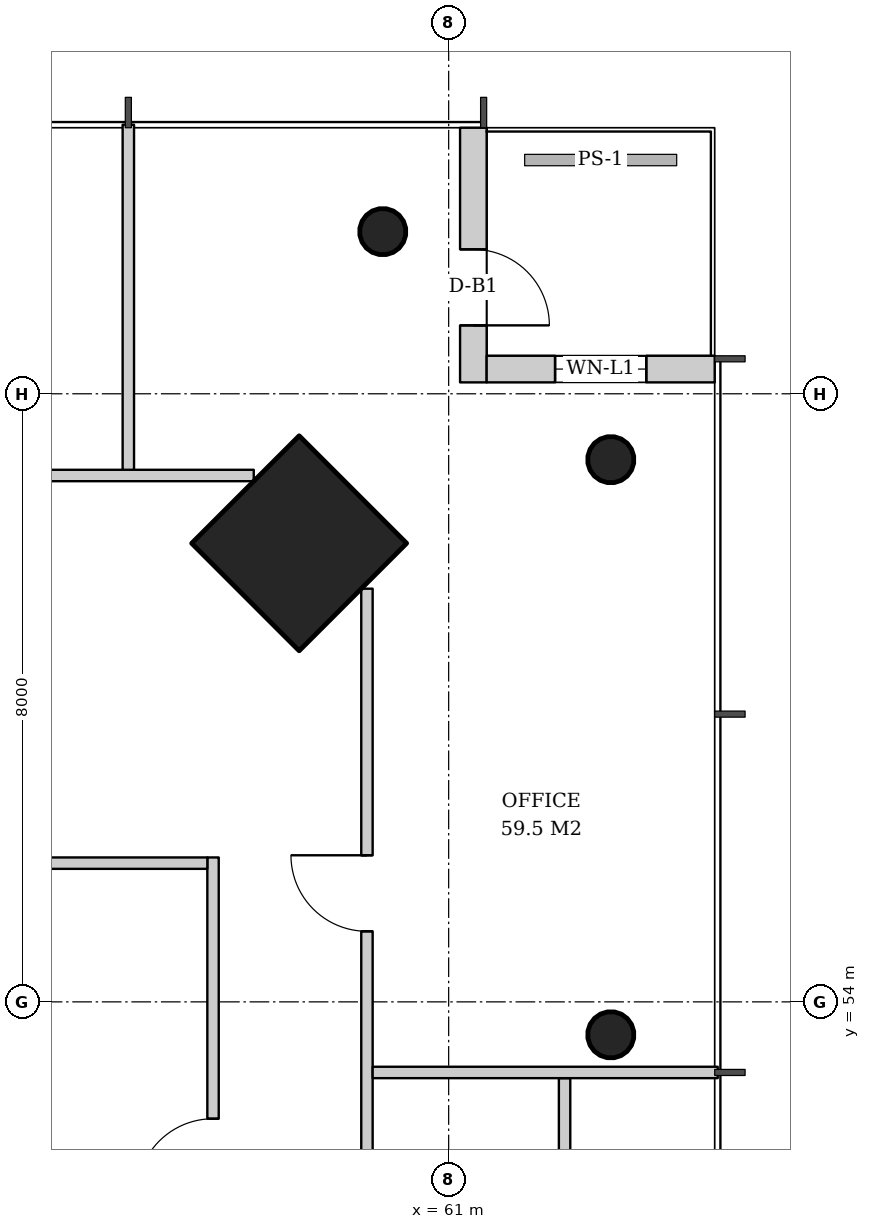
"""IFC4 building model, lengths in metres.
Left out: names, types, materials, properties, quantities, classifications, styles, units other than length and angle.
Written with IfcOpenShell. Run it as: python <this file> out.ifc"""

import sys

from ifc_helpers import new_model, si_unit, direction, frame, frame_2d, origin, origin_2d, place, context, subcontext, project, spatial, rectangle, hollow_circle, extrude, element, fill, save


model = new_model("IFC4")
c1 = context("Model", 3, precision=1e-05, world=origin(), true_north=direction((0.0, 1.0)))
c2 = subcontext(c1, "Body", "Model", "MODEL_VIEW")
j1 = project(units=[si_unit("LENGTHUNIT", "METRE"), si_unit("PLANEANGLEUNIT", "RADIAN")], contexts=[c1])
p1 = place(None, origin())
s1 = spatial("IfcSite", under=j1, at=p1, CompositionType="ELEMENT")
p2 = place(p1, origin())
s2 = spatial("IfcBuilding", under=s1, at=p2, CompositionType="ELEMENT")
p3 = place(p2, frame((0.0, 0.0, 203.4)))
s3 = spatial("IfcBuildingStorey", under=s2, at=p3, CompositionType="ELEMENT", Elevation=203.4)
p4 = place(p3, frame((59.072, 60.072, 0.0), z_axis=(-0.031962158256, -0.031962158256, 0.998977898093), x_axis=(0.707106781187, -0.707106781187, 0.0)))
e1 = element("IfcColumn", 1, at=p4, inside=s3, PredefinedType="COLUMN", context=c2, shape_type="SweptSolid", body=[
    extrude(rectangle(XDim=2.0, YDim=2.0, at=origin_2d()), origin(), (0.0, 0.0, 1.0), 3.804),
])
p5 = place(p3, frame((63.171, 61.171, 0.0), z_axis=(-0.031898107953, -0.031898107953, 0.998981992539), x_axis=(0.707106781187, -0.707106781187, 0.0)))
e2 = element("IfcColumn", 2, at=p5, inside=s3, PredefinedType="COLUMN", context=c2, shape_type="SweptSolid", body=[
    extrude(hollow_circle(Radius=0.305, WallThickness=0.025, at=origin_2d()), origin(), (0.0, 0.0, 1.0), 3.804),
])
p6 = place(p3, frame((63.171, 53.586, 0.0), z_axis=(-0.031910269556, -0.015987237665, 0.999362868496), x_axis=(0.447933021895, -0.894067115991, 0.0)))
e3 = element("IfcColumn", 3, at=p6, inside=s3, PredefinedType="COLUMN", context=c2, shape_type="SweptSolid", body=[
    extrude(hollow_circle(Radius=0.305, WallThickness=0.025, at=origin_2d()), origin(), (0.0, 0.0, 1.0), 3.802),
])
p7 = place(p3, frame((60.171, 64.171, 0.0), z_axis=(-0.031898107953, -0.031898107953, 0.998981992539), x_axis=(0.707106781187, -0.707106781187, 0.0)))
e4 = element("IfcColumn", 4, at=p7, inside=s3, PredefinedType="COLUMN", context=c2, shape_type="SweptSolid", body=[
    extrude(hollow_circle(Radius=0.305, WallThickness=0.025, at=origin_2d()), origin(), (0.0, 0.0, 1.0), 3.804),
])
p8 = place(p3, frame((61.325, 65.5, 0.0), z_axis=(0.0, 0.0, 1.0), x_axis=(0.0, -1.0, 0.0)))
e5 = element("IfcWall", 5, at=p8, inside=s3, PredefinedType="SOLIDWALL", context=c2, shape_type="SweptSolid", body=[
    extrude(rectangle(XDim=3.35, YDim=0.35, at=frame_2d((1.675, 0.0))), origin(), (0.0, 0.0, 1.0), 3.62),
])
p9 = place(p8, frame((1.6, 0.0, 0.0)))
e6 = element("IfcOpeningElement", 6, at=p9, cuts=e5, PredefinedType="OPENING", context=c2, shape_type="SweptSolid", body=[
    extrude(rectangle(XDim=1.0, YDim=2.4, at=frame_2d((0.5, 1.2))), frame((0.0, 0.185, 0.0), z_axis=(0.0, -1.0, 0.0), x_axis=(1.0, 0.0, 0.0)), (0.0, 0.0, 1.0), 0.37),
])
p10 = place(p3, frame((61.5, 62.325, 0.0), z_axis=(0.0, 0.0, 1.0), x_axis=(1.0, 0.0, 0.0)))
e7 = element("IfcWall", 7, at=p10, inside=s3, PredefinedType="SOLIDWALL", context=c2, shape_type="SweptSolid", body=[
    extrude(rectangle(XDim=3.0, YDim=0.35, at=frame_2d((1.5, 0.0))), origin(), (0.0, 0.0, 1.0), 3.62),
])
p11 = place(p10, frame((0.9, 0.0, 0.6)))
e8 = element("IfcOpeningElement", 8, at=p11, cuts=e7, PredefinedType="OPENING", context=c2, shape_type="SweptSolid", body=[
    extrude(rectangle(XDim=1.2, YDim=2.55, at=frame_2d((0.6, 1.275))), frame((0.0, 0.185, 0.0), z_axis=(0.0, -1.0, 0.0), x_axis=(1.0, 0.0, 0.0)), (0.0, 0.0, 1.0), 0.37),
])
p12 = place(p3, frame((57.9, 48.025, 0.0), z_axis=(0.0, 0.0, 1.0), x_axis=(0.0, 1.0, 0.0)))
e9 = element("IfcWall", 9, at=p12, inside=s3, PredefinedType="PARTITIONING", context=c2, shape_type="SweptSolid", body=[
    extrude(rectangle(XDim=7.875, YDim=0.15, at=frame_2d((3.938, 0.0))), origin(), (0.0, 0.0, 1.0), 2.867),
])
p13 = place(p12, frame((3.438, 0.0, 0.0)))
e10 = element("IfcOpeningElement", 10, at=p13, cuts=e9, PredefinedType="OPENING", context=c2, shape_type="SweptSolid", body=[
    extrude(rectangle(XDim=1.0, YDim=2.1, at=frame_2d((0.5, 1.05))), frame((0.0, 0.085, 0.0), z_axis=(0.0, -1.0, 0.0), x_axis=(1.0, 0.0, 0.0)), (0.0, 0.0, 1.0), 0.17),
])
p14 = place(p3, frame((54.9, 55.825, 0.0), z_axis=(0.0, 0.0, 1.0), x_axis=(1.0, 0.0, 0.0)))
e11 = element("IfcWall", 11, at=p14, inside=s3, PredefinedType="PARTITIONING", context=c2, shape_type="SweptSolid", body=[
    extrude(rectangle(XDim=2.925, YDim=0.15, at=frame_2d((1.462, 0.0))), origin(), (0.0, 0.0, 1.0), 3.62),
])
p15 = place(p3, frame((62.525, 48.432, 0.0), z_axis=(0.0, 0.0, 1.0), x_axis=(0.0, 1.0, 0.0)))
e12 = element("IfcWall", 12, at=p15, inside=s3, PredefinedType="PARTITIONING", context=c2, shape_type="SweptSolid", body=[
    extrude(rectangle(XDim=4.564, YDim=0.15, at=frame_2d((2.282, 0.0))), origin(), (0.0, 0.0, 1.0), 2.867),
])
p16 = place(p3, frame((59.925, 32.564, 0.0), z_axis=(0.0, 0.0, 1.0), x_axis=(0.0, 1.0, 0.0)))
e13 = element("IfcWall", 13, at=p16, inside=s3, PredefinedType="PARTITIONING", context=c2, shape_type="SweptSolid", body=[
    extrude(rectangle(XDim=26.872, YDim=0.15, at=frame_2d((13.436, 0.0))), origin(), (0.0, 0.0, 1.0), 2.867),
])
p17 = place(p16, frame((3.507, 0.0, 0.0)))
e14 = element("IfcOpeningElement", 14, at=p17, cuts=e13, PredefinedType="OPENING", context=c2, shape_type="SweptSolid", body=[
    extrude(rectangle(XDim=1.0, YDim=2.1, at=frame_2d((0.5, 1.05))), frame((0.0, 0.085, 0.0), z_axis=(0.0, -1.0, 0.0), x_axis=(1.0, 0.0, 0.0)), (0.0, 0.0, 1.0), 0.17),
])
p18 = place(p16, frame((8.221, 0.0, 0.0)))
e15 = element("IfcOpeningElement", 15, at=p18, cuts=e13, PredefinedType="OPENING", context=c2, shape_type="SweptSolid", body=[
    extrude(rectangle(XDim=1.0, YDim=2.1, at=frame_2d((0.5, 1.05))), frame((0.0, 0.085, 0.0), z_axis=(0.0, -1.0, 0.0), x_axis=(1.0, 0.0, 0.0)), (0.0, 0.0, 1.0), 0.17),
])
p19 = place(p16, frame((12.936, 0.0, 0.0)))
e16 = element("IfcOpeningElement", 16, at=p19, cuts=e13, PredefinedType="OPENING", context=c2, shape_type="SweptSolid", body=[
    extrude(rectangle(XDim=1.0, YDim=2.1, at=frame_2d((0.5, 1.05))), frame((0.0, 0.085, 0.0), z_axis=(0.0, -1.0, 0.0), x_axis=(1.0, 0.0, 0.0)), (0.0, 0.0, 1.0), 0.17),
])
p20 = place(p16, frame((17.65, 0.0, 0.0)))
e17 = element("IfcOpeningElement", 17, at=p20, cuts=e13, PredefinedType="OPENING", context=c2, shape_type="SweptSolid", body=[
    extrude(rectangle(XDim=1.0, YDim=2.1, at=frame_2d((0.5, 1.05))), frame((0.0, 0.085, 0.0), z_axis=(0.0, -1.0, 0.0), x_axis=(1.0, 0.0, 0.0)), (0.0, 0.0, 1.0), 0.17),
])
p21 = place(p16, frame((22.364, 0.0, 0.0)))
e18 = element("IfcOpeningElement", 18, at=p21, cuts=e13, PredefinedType="OPENING", context=c2, shape_type="SweptSolid", body=[
    extrude(rectangle(XDim=1.0, YDim=2.1, at=frame_2d((0.5, 1.05))), frame((0.0, 0.085, 0.0), z_axis=(0.0, -1.0, 0.0), x_axis=(1.0, 0.0, 0.0)), (0.0, 0.0, 1.0), 0.17),
])
p22 = place(p3, frame((60.0, 53.072, 0.0), z_axis=(0.0, 0.0, 1.0), x_axis=(1.0, 0.0, 0.0)))
e19 = element("IfcWall", 19, at=p22, inside=s3, PredefinedType="PARTITIONING", context=c2, shape_type="SweptSolid", body=[
    extrude(rectangle(XDim=4.54, YDim=0.15, at=frame_2d((2.27, 0.0))), origin(), (0.0, 0.0, 1.0), 3.12),
])
p23 = place(p3, frame((58.436, 60.925, 0.0), z_axis=(0.0, 0.0, 1.0), x_axis=(-1.0, 0.0, 0.0)))
e20 = element("IfcWall", 20, at=p23, inside=s3, PredefinedType="PARTITIONING", context=c2, shape_type="SweptSolid", body=[
    extrude(rectangle(XDim=26.872, YDim=0.15, at=frame_2d((13.436, 0.0))), origin(), (0.0, 0.0, 1.0), 2.867),
])
p24 = place(p23, frame((3.507, 0.0, 0.0)))
e21 = element("IfcOpeningElement", 21, at=p24, cuts=e20, PredefinedType="OPENING", context=c2, shape_type="SweptSolid", body=[
    extrude(rectangle(XDim=1.0, YDim=2.1, at=frame_2d((0.5, 1.05))), frame((0.0, 0.085, 0.0), z_axis=(0.0, -1.0, 0.0), x_axis=(1.0, 0.0, 0.0)), (0.0, 0.0, 1.0), 0.17),
])
p25 = place(p23, frame((8.221, 0.0, 0.0)))
e22 = element("IfcOpeningElement", 22, at=p25, cuts=e20, PredefinedType="OPENING", context=c2, shape_type="SweptSolid", body=[
    extrude(rectangle(XDim=1.0, YDim=2.1, at=frame_2d((0.5, 1.05))), frame((0.0, 0.085, 0.0), z_axis=(0.0, -1.0, 0.0), x_axis=(1.0, 0.0, 0.0)), (0.0, 0.0, 1.0), 0.17),
])
p26 = place(p23, frame((12.536, 0.0, 0.0)))
e23 = element("IfcOpeningElement", 23, at=p26, cuts=e20, PredefinedType="OPENING", context=c2, shape_type="SweptSolid", body=[
    extrude(rectangle(XDim=1.8, YDim=2.4, at=frame_2d((0.9, 1.2))), frame((0.0, 0.085, 0.0), z_axis=(0.0, -1.0, 0.0), x_axis=(1.0, 0.0, 0.0)), (0.0, 0.0, 1.0), 0.17),
])
p27 = place(p23, frame((22.364, 0.0, 0.0)))
e24 = element("IfcOpeningElement", 24, at=p27, cuts=e20, PredefinedType="OPENING", context=c2, shape_type="SweptSolid", body=[
    extrude(rectangle(XDim=1.0, YDim=2.1, at=frame_2d((0.5, 1.05))), frame((0.0, 0.085, 0.0), z_axis=(0.0, -1.0, 0.0), x_axis=(1.0, 0.0, 0.0)), (0.0, 0.0, 1.0), 0.17),
])
p28 = place(p3, frame((56.786, 61.0, 0.0), z_axis=(0.0, 0.0, 1.0), x_axis=(0.0, 1.0, 0.0)))
e25 = element("IfcWall", 25, at=p28, inside=s3, PredefinedType="PARTITIONING", context=c2, shape_type="SweptSolid", body=[
    extrude(rectangle(XDim=4.54, YDim=0.15, at=frame_2d((2.27, 0.0))), origin(), (0.0, 0.0, 1.0), 3.12),
])
p29 = place(p9, origin())
e26 = element("IfcDoor", 26, at=p29, inside=s3, OperationType="SINGLE_SWING_RIGHT", PredefinedType="DOOR", context=c2, shape_type="SweptSolid", body=[
    extrude(rectangle(XDim=1.0, YDim=2.4, at=frame_2d((0.5, 1.2))), frame((0.0, 0.025, 0.0), z_axis=(0.0, -1.0, 0.0), x_axis=(1.0, 0.0, 0.0)), (0.0, 0.0, 1.0), 0.05),
])
fill(e6, e26)
p30 = place(p11, origin())
e27 = element("IfcWindow", 27, at=p30, inside=s3, PartitioningType="SINGLE_PANEL", PredefinedType="WINDOW", context=c2, shape_type="SweptSolid", body=[
    extrude(rectangle(XDim=1.2, YDim=2.55, at=frame_2d((0.6, 1.275))), frame((0.0, 0.03, 0.0), z_axis=(0.0, -1.0, 0.0), x_axis=(1.0, 0.0, 0.0)), (0.0, 0.0, 1.0), 0.06),
])
fill(e8, e27)
p31 = place(p13, origin())
e28 = element("IfcDoor", 28, at=p31, inside=s3, OperationType="SINGLE_SWING_LEFT", PredefinedType="DOOR", context=c2, shape_type="SweptSolid", body=[
    extrude(rectangle(XDim=1.0, YDim=2.1, at=frame_2d((0.5, 1.05))), frame((0.0, 0.025, 0.0), z_axis=(0.0, -1.0, 0.0), x_axis=(1.0, 0.0, 0.0)), (0.0, 0.0, 1.0), 0.05),
])
fill(e10, e28)
p32 = place(p21, origin())
e29 = element("IfcDoor", 29, at=p32, inside=s3, OperationType="SINGLE_SWING_RIGHT", PredefinedType="DOOR", context=c2, shape_type="SweptSolid", body=[
    extrude(rectangle(XDim=1.0, YDim=2.1, at=frame_2d((0.5, 1.05))), frame((0.0, 0.025, 0.0), z_axis=(0.0, -1.0, 0.0), x_axis=(1.0, 0.0, 0.0)), (0.0, 0.0, 1.0), 0.05),
])
fill(e18, e29)
save(model, sys.argv[1])
